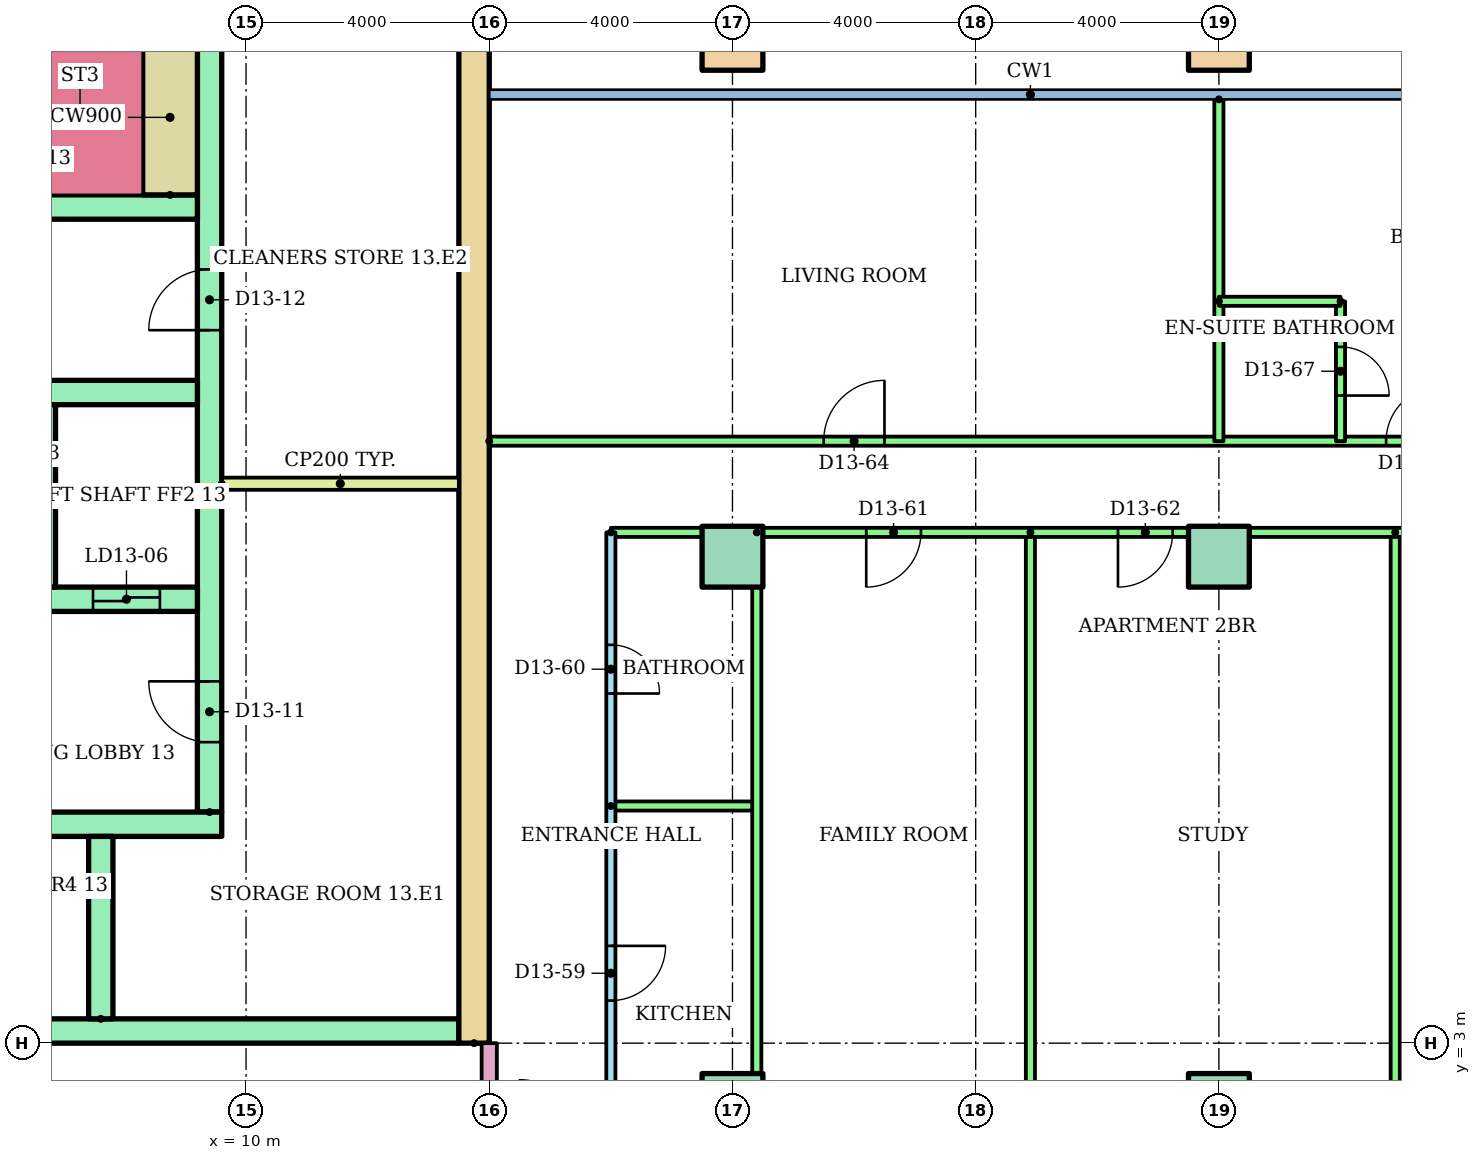
"""IFC4 building model, lengths in metres.
Left out: names, types, materials, properties, quantities, classifications, styles, units other than length and angle.
Written with IfcOpenShell. Run it as: python <this file> out.ifc"""

import sys

from ifc_helpers import new_model, si_unit, direction, frame, frame_2d, origin, origin_2d, place, context, subcontext, project, spatial, rectangle, hollow_rectangle, extrude, element, fill, save


model = new_model("IFC4")
c1 = context("Model", 3, precision=1e-05, world=origin(), true_north=direction((0.0, 1.0)))
c2 = subcontext(c1, "Body", "Model", "MODEL_VIEW")
j1 = project(units=[si_unit("LENGTHUNIT", "METRE"), si_unit("PLANEANGLEUNIT", "RADIAN")], contexts=[c1])
p1 = place(None, origin())
s1 = spatial("IfcSite", under=j1, at=p1, CompositionType="ELEMENT")
p2 = place(p1, origin())
s2 = spatial("IfcBuilding", under=s1, at=p2, CompositionType="ELEMENT")
p3 = place(p2, frame((0.0, 0.0, 51.2)))
s3 = spatial("IfcBuildingStorey", under=s2, at=p3, CompositionType="ELEMENT", Elevation=51.2)
for number, where in (
    (1, (18.0, 2.0, 0.0)),
    (2, (26.0, 2.0, 0.0)),
    (3, (18.0, 11.0, 0.0)),
    (4, (26.0, 11.0, 0.0)),
):
    element("IfcColumn", number, at=place(p3, frame(where)), inside=s3, PredefinedType="COLUMN", context=c2, shape_type="SweptSolid", body=[
        extrude(rectangle(XDim=1.0, YDim=1.0, at=origin_2d()), origin(), (0.0, 0.0, 1.0), 3.2),
    ])
for number, where in (
    (5, (18.0, 19.5, 0.0)),
    (6, (26.0, 19.5, 0.0)),
):
    element("IfcColumn", number, at=place(p3, frame(where)), inside=s3, PredefinedType="COLUMN", context=c2, shape_type="SweptSolid", body=[
        extrude(hollow_rectangle(XDim=1.0, YDim=1.0, WallThickness=0.05, at=origin_2d()), origin(), (0.0, 0.0, 1.0), 3.2),
    ])
p4 = place(p3, frame((13.75, 3.0, 0.0), z_axis=(0.0, 0.0, 1.0), x_axis=(0.0, 1.0, 0.0)))
e7 = element("IfcWall", 7, at=p4, inside=s3, PredefinedType="SHEAR", context=c2, shape_type="SweptSolid", body=[
    extrude(rectangle(XDim=17.0, YDim=0.5, at=frame_2d((8.5, 0.0))), origin(), (0.0, 0.0, 1.0), 2.92),
])
p5 = place(p3, frame((9.4, 6.8, 0.0), z_axis=(0.0, 0.0, 1.0), x_axis=(0.0, 1.0, 0.0)))
e8 = element("IfcWall", 8, at=p5, inside=s3, PredefinedType="SHEAR", context=c2, shape_type="SweptSolid", body=[
    extrude(rectangle(XDim=12.7, YDim=0.4, at=frame_2d((6.35, 0.0))), origin(), (0.0, 0.0, 1.0), 2.92),
])
p6 = place(p5, frame((1.15, 0.0, 0.0)))
e9 = element("IfcOpeningElement", 9, at=p6, cuts=e8, PredefinedType="OPENING", context=c2, shape_type="SweptSolid", body=[
    extrude(rectangle(XDim=1.0, YDim=2.1, at=frame_2d((0.5, 1.05))), frame((0.0, 0.21, 0.0), z_axis=(0.0, -1.0, 0.0), x_axis=(1.0, 0.0, 0.0)), (0.0, 0.0, 1.0), 0.42),
])
p7 = place(p5, frame((7.925, 0.0, 0.0)))
e10 = element("IfcOpeningElement", 10, at=p7, cuts=e8, PredefinedType="OPENING", context=c2, shape_type="SweptSolid", body=[
    extrude(rectangle(XDim=1.0, YDim=2.1, at=frame_2d((0.5, 1.05))), frame((0.0, 0.21, 0.0), z_axis=(0.0, -1.0, 0.0), x_axis=(1.0, 0.0, 0.0)), (0.0, 0.0, 1.0), 0.42),
])
p8 = place(p3, frame((-13.5, 3.2, 0.0)))
e11 = element("IfcWall", 11, at=p8, inside=s3, PredefinedType="SHEAR", context=c2, shape_type="SweptSolid", body=[
    extrude(rectangle(XDim=27.0, YDim=0.4, at=frame_2d((13.5, 0.0))), origin(), (0.0, 0.0, 1.0), 2.92),
])
p9 = place(p8, frame((6.861, 0.0, 0.0)))
e12 = element("IfcOpeningElement", 12, at=p9, cuts=e11, PredefinedType="OPENING", context=c2, shape_type="SweptSolid", body=[
    extrude(rectangle(XDim=1.1, YDim=2.1, at=frame_2d((0.55, 1.05))), frame((0.0, 0.21, 0.0), z_axis=(0.0, -1.0, 0.0), x_axis=(1.0, 0.0, 0.0)), (0.0, 0.0, 1.0), 0.42),
])
p10 = place(p8, frame((9.906, 0.0, 0.0)))
e13 = element("IfcOpeningElement", 13, at=p10, cuts=e11, PredefinedType="OPENING", context=c2, shape_type="SweptSolid", body=[
    extrude(rectangle(XDim=1.1, YDim=2.1, at=frame_2d((0.55, 1.05))), frame((0.0, 0.21, 0.0), z_axis=(0.0, -1.0, 0.0), x_axis=(1.0, 0.0, 0.0)), (0.0, 0.0, 1.0), 0.42),
])
p11 = place(p8, frame((15.994, 0.0, 0.0)))
e14 = element("IfcOpeningElement", 14, at=p11, cuts=e11, PredefinedType="OPENING", context=c2, shape_type="SweptSolid", body=[
    extrude(rectangle(XDim=1.1, YDim=2.1, at=frame_2d((0.55, 1.05))), frame((0.0, 0.21, 0.0), z_axis=(0.0, -1.0, 0.0), x_axis=(1.0, 0.0, 0.0)), (0.0, 0.0, 1.0), 0.42),
])
p12 = place(p8, frame((19.039, 0.0, 0.0)))
e15 = element("IfcOpeningElement", 15, at=p12, cuts=e11, PredefinedType="OPENING", context=c2, shape_type="SweptSolid", body=[
    extrude(rectangle(XDim=1.1, YDim=2.1, at=frame_2d((0.55, 1.05))), frame((0.0, 0.21, 0.0), z_axis=(0.0, -1.0, 0.0), x_axis=(1.0, 0.0, 0.0)), (0.0, 0.0, 1.0), 0.42),
])
p13 = place(p8, frame((12.6, 0.0, 0.0)))
e16 = element("IfcOpeningElement", 16, at=p13, cuts=e11, PredefinedType="OPENING", context=c2, shape_type="SweptSolid", body=[
    extrude(rectangle(XDim=1.8, YDim=2.1, at=frame_2d((0.9, 1.05))), frame((0.0, 0.21, 0.0), z_axis=(0.0, -1.0, 0.0), x_axis=(1.0, 0.0, 0.0)), (0.0, 0.0, 1.0), 0.42),
])
p14 = place(p3, frame((1.522, 6.6, 0.0)))
e17 = element("IfcWall", 17, at=p14, inside=s3, PredefinedType="SHEAR", context=c2, shape_type="SweptSolid", body=[
    extrude(rectangle(XDim=8.078, YDim=0.4, at=frame_2d((4.039, 0.0))), origin(), (0.0, 0.0, 1.0), 2.92),
])
p15 = place(p3, frame((7.611, 3.4, 0.0), z_axis=(0.0, 0.0, 1.0), x_axis=(0.0, 1.0, 0.0)))
e18 = element("IfcWall", 18, at=p15, inside=s3, PredefinedType="SHEAR", context=c2, shape_type="SweptSolid", body=[
    extrude(rectangle(XDim=3.0, YDim=0.4, at=frame_2d((1.5, 0.0))), origin(), (0.0, 0.0, 1.0), 2.92),
])
p16 = place(p3, frame((1.2, 10.3, 0.0)))
e19 = element("IfcWall", 19, at=p16, inside=s3, PredefinedType="SHEAR", context=c2, shape_type="SweptSolid", body=[
    extrude(rectangle(XDim=8.0, YDim=0.4, at=frame_2d((4.0, 0.0))), origin(), (0.0, 0.0, 1.0), 2.92),
])
p17 = place(p16, frame((3.55, 0.0, 0.0)))
e20 = element("IfcOpeningElement", 20, at=p17, cuts=e19, PredefinedType="OPENING", context=c2, shape_type="SweptSolid", body=[
    extrude(rectangle(XDim=1.1, YDim=2.1, at=frame_2d((0.55, 1.05))), frame((0.0, 0.21, 0.0), z_axis=(0.0, -1.0, 0.0), x_axis=(1.0, 0.0, 0.0)), (0.0, 0.0, 1.0), 0.42),
])
p18 = place(p16, frame((6.283, 0.0, 0.0)))
e21 = element("IfcOpeningElement", 21, at=p18, cuts=e19, PredefinedType="OPENING", context=c2, shape_type="SweptSolid", body=[
    extrude(rectangle(XDim=1.1, YDim=2.1, at=frame_2d((0.55, 1.05))), frame((0.0, 0.21, 0.0), z_axis=(0.0, -1.0, 0.0), x_axis=(1.0, 0.0, 0.0)), (0.0, 0.0, 1.0), 0.42),
])
p19 = place(p16, frame((0.867, 0.0, 0.0)))
e22 = element("IfcOpeningElement", 22, at=p19, cuts=e19, PredefinedType="OPENING", context=c2, shape_type="SweptSolid", body=[
    extrude(rectangle(XDim=1.0, YDim=2.1, at=frame_2d((0.5, 1.05))), frame((0.0, 0.21, 0.0), z_axis=(0.0, -1.0, 0.0), x_axis=(1.0, 0.0, 0.0)), (0.0, 0.0, 1.0), 0.42),
])
p20 = place(p3, frame((1.2, 13.7, 0.0)))
e23 = element("IfcWall", 23, at=p20, inside=s3, PredefinedType="SHEAR", context=c2, shape_type="SweptSolid", body=[
    extrude(rectangle(XDim=8.0, YDim=0.4, at=frame_2d((4.0, 0.0))), origin(), (0.0, 0.0, 1.0), 2.92),
])
p21 = place(p3, frame((6.667, 10.5, 0.0), z_axis=(0.0, 0.0, 1.0), x_axis=(0.0, 1.0, 0.0)))
e24 = element("IfcWall", 24, at=p21, inside=s3, PredefinedType="SHEAR", context=c2, shape_type="SweptSolid", body=[
    extrude(rectangle(XDim=3.0, YDim=0.4, at=frame_2d((1.5, 0.0))), origin(), (0.0, 0.0, 1.0), 2.92),
])
p22 = place(p3, frame((-9.2, 16.75, 0.0)))
e25 = element("IfcWall", 25, at=p22, inside=s3, PredefinedType="SHEAR", context=c2, shape_type="SweptSolid", body=[
    extrude(rectangle(XDim=18.4, YDim=0.4, at=frame_2d((9.2, 0.0))), origin(), (0.0, 0.0, 1.0), 2.92),
])
p23 = place(p22, frame((0.1, 0.0, 0.0)))
e26 = element("IfcOpeningElement", 26, at=p23, cuts=e25, PredefinedType="OPENING", context=c2, shape_type="SweptSolid", body=[
    extrude(rectangle(XDim=0.95, YDim=2.1, at=frame_2d((0.475, 1.05))), frame((0.0, 0.21, 0.0), z_axis=(0.0, -1.0, 0.0), x_axis=(1.0, 0.0, 0.0)), (0.0, 0.0, 1.0), 0.42),
])
p24 = place(p22, frame((6.1, 0.0, 0.0)))
e27 = element("IfcOpeningElement", 27, at=p24, cuts=e25, PredefinedType="OPENING", context=c2, shape_type="SweptSolid", body=[
    extrude(rectangle(XDim=0.95, YDim=2.1, at=frame_2d((0.475, 1.05))), frame((0.0, 0.21, 0.0), z_axis=(0.0, -1.0, 0.0), x_axis=(1.0, 0.0, 0.0)), (0.0, 0.0, 1.0), 0.42),
])
p25 = place(p22, frame((12.1, 0.0, 0.0)))
e28 = element("IfcOpeningElement", 28, at=p25, cuts=e25, PredefinedType="OPENING", context=c2, shape_type="SweptSolid", body=[
    extrude(rectangle(XDim=0.95, YDim=2.1, at=frame_2d((0.475, 1.05))), frame((0.0, 0.21, 0.0), z_axis=(0.0, -1.0, 0.0), x_axis=(1.0, 0.0, 0.0)), (0.0, 0.0, 1.0), 0.42),
])
p26 = place(p3, frame((8.75, 16.95, 0.0), z_axis=(0.0, 0.0, 1.0), x_axis=(0.0, 1.0, 0.0)))
e29 = element("IfcWall", 29, at=p26, inside=s3, PredefinedType="SHEAR", context=c2, shape_type="SweptSolid", body=[
    extrude(rectangle(XDim=2.55, YDim=0.9, at=frame_2d((1.275, 0.0))), origin(), (0.0, 0.0, 1.0), 2.92),
])
p27 = place(p3, frame((9.6, 12.2, 0.0)))
e30 = element("IfcWall", 30, at=p27, inside=s3, PredefinedType="PARTITIONING", context=c2, shape_type="SweptSolid", body=[
    extrude(rectangle(XDim=3.9, YDim=0.2, at=frame_2d((1.95, 0.0))), origin(), (0.0, 0.0, 1.0), 2.92),
])
p28 = place(p3, frame((16.0, 11.4, 0.0), z_axis=(0.0, 0.0, 1.0), x_axis=(0.0, -1.0, 0.0)))
e31 = element("IfcWall", 31, at=p28, inside=s3, PredefinedType="PARTITIONING", context=c2, shape_type="SweptSolid", body=[
    extrude(rectangle(XDim=10.0, YDim=0.15, at=frame_2d((5.0, 0.0))), origin(), (0.0, 0.0, 1.0), 2.4),
])
p29 = place(p28, frame((6.8, 0.0, 0.0)))
e32 = element("IfcOpeningElement", 32, at=p29, cuts=e31, PredefinedType="OPENING", context=c2, shape_type="SweptSolid", body=[
    extrude(rectangle(XDim=0.9, YDim=2.1, at=frame_2d((0.45, 1.05))), frame((0.0, 0.085, 0.0), z_axis=(0.0, -1.0, 0.0), x_axis=(1.0, 0.0, 0.0)), (0.0, 0.0, 1.0), 0.17),
])
p30 = place(p28, frame((1.85, 0.0, 0.0)))
e33 = element("IfcOpeningElement", 33, at=p30, cuts=e31, PredefinedType="OPENING", context=c2, shape_type="SweptSolid", body=[
    extrude(rectangle(XDim=0.8, YDim=2.1, at=frame_2d((0.4, 1.05))), frame((0.0, 0.085, 0.0), z_axis=(0.0, -1.0, 0.0), x_axis=(1.0, 0.0, 0.0)), (0.0, 0.0, 1.0), 0.17),
])
p31 = place(p3, frame((16.0, 6.9, 0.0)))
e34 = element("IfcWall", 34, at=p31, inside=s3, PredefinedType="PARTITIONING", context=c2, shape_type="SweptSolid", body=[
    extrude(rectangle(XDim=2.4, YDim=0.15, at=frame_2d((1.2, 0.0))), origin(), (0.0, 0.0, 1.0), 2.4),
])
for number, where, z_axis, x_axis in (
    (35, (18.4, 11.4, 0.0), (0.0, 0.0, 1.0), (0.0, -1.0, 0.0)),
    (36, (22.9, 11.4, 0.0), (0.0, 0.0, 1.0), (0.0, -1.0, 0.0)),
    (37, (28.9, 11.4, 0.0), (0.0, 0.0, 1.0), (0.0, -1.0, 0.0)),
):
    element("IfcWall", number, at=place(p3, frame(where, z_axis=z_axis, x_axis=x_axis)), inside=s3, PredefinedType="PARTITIONING", context=c2, shape_type="SweptSolid", body=[
        extrude(rectangle(XDim=10.0, YDim=0.15, at=frame_2d((5.0, 0.0))), origin(), (0.0, 0.0, 1.0), 2.4),
    ])
p32 = place(p3, frame((36.52, 11.4, 0.0), z_axis=(0.0, 0.0, 1.0), x_axis=(-1.0, 0.0, 0.0)))
e38 = element("IfcWall", 38, at=p32, inside=s3, PredefinedType="PARTITIONING", context=c2, shape_type="SweptSolid", body=[
    extrude(rectangle(XDim=20.52, YDim=0.15, at=frame_2d((10.26, 0.0))), origin(), (0.0, 0.0, 1.0), 2.4),
])
p33 = place(p32, frame((15.42, 0.0, 0.0)))
e39 = element("IfcOpeningElement", 39, at=p33, cuts=e38, PredefinedType="OPENING", context=c2, shape_type="SweptSolid", body=[
    extrude(rectangle(XDim=0.9, YDim=2.1, at=frame_2d((0.45, 1.05))), frame((0.0, 0.085, 0.0), z_axis=(0.0, -1.0, 0.0), x_axis=(1.0, 0.0, 0.0)), (0.0, 0.0, 1.0), 0.17),
])
p34 = place(p32, frame((11.28, 0.0, 0.0)))
e40 = element("IfcOpeningElement", 40, at=p34, cuts=e38, PredefinedType="OPENING", context=c2, shape_type="SweptSolid", body=[
    extrude(rectangle(XDim=0.9, YDim=2.1, at=frame_2d((0.45, 1.05))), frame((0.0, 0.085, 0.0), z_axis=(0.0, -1.0, 0.0), x_axis=(1.0, 0.0, 0.0)), (0.0, 0.0, 1.0), 0.17),
])
p35 = place(p32, frame((3.47, 0.0, 0.0)))
e41 = element("IfcOpeningElement", 41, at=p35, cuts=e38, PredefinedType="OPENING", context=c2, shape_type="SweptSolid", body=[
    extrude(rectangle(XDim=0.9, YDim=2.1, at=frame_2d((0.45, 1.05))), frame((0.0, 0.085, 0.0), z_axis=(0.0, -1.0, 0.0), x_axis=(1.0, 0.0, 0.0)), (0.0, 0.0, 1.0), 0.17),
])
p36 = place(p3, frame((14.0, 12.9, 0.0)))
e42 = element("IfcWall", 42, at=p36, inside=s3, PredefinedType="PARTITIONING", context=c2, shape_type="SweptSolid", body=[
    extrude(rectangle(XDim=22.52, YDim=0.15, at=frame_2d((11.26, 0.0))), origin(), (0.0, 0.0, 1.0), 2.4),
])
p37 = place(p36, frame((5.5, 0.0, 0.0)))
e43 = element("IfcOpeningElement", 43, at=p37, cuts=e42, PredefinedType="OPENING", context=c2, shape_type="SweptSolid", body=[
    extrude(rectangle(XDim=1.0, YDim=2.1, at=frame_2d((0.5, 1.05))), frame((0.0, 0.085, 0.0), z_axis=(0.0, -1.0, 0.0), x_axis=(1.0, 0.0, 0.0)), (0.0, 0.0, 1.0), 0.17),
])
p38 = place(p36, frame((14.75, 0.0, 0.0)))
e44 = element("IfcOpeningElement", 44, at=p38, cuts=e42, PredefinedType="OPENING", context=c2, shape_type="SweptSolid", body=[
    extrude(rectangle(XDim=0.9, YDim=2.1, at=frame_2d((0.45, 1.05))), frame((0.0, 0.085, 0.0), z_axis=(0.0, -1.0, 0.0), x_axis=(1.0, 0.0, 0.0)), (0.0, 0.0, 1.0), 0.17),
])
p39 = place(p36, frame((20.76, 0.0, 0.0)))
e45 = element("IfcOpeningElement", 45, at=p39, cuts=e42, PredefinedType="OPENING", context=c2, shape_type="SweptSolid", body=[
    extrude(rectangle(XDim=0.9, YDim=2.1, at=frame_2d((0.45, 1.05))), frame((0.0, 0.085, 0.0), z_axis=(0.0, -1.0, 0.0), x_axis=(1.0, 0.0, 0.0)), (0.0, 0.0, 1.0), 0.17),
])
p40 = place(p3, frame((26.0, 18.521, 0.0), z_axis=(0.0, 0.0, 1.0), x_axis=(0.0, -1.0, 0.0)))
e46 = element("IfcWall", 46, at=p40, inside=s3, PredefinedType="PARTITIONING", context=c2, shape_type="SweptSolid", body=[
    extrude(rectangle(XDim=5.621, YDim=0.15, at=frame_2d((2.811, 0.0))), origin(), (0.0, 0.0, 1.0), 2.4),
])
p41 = place(p3, frame((28.0, 15.2, 0.0), z_axis=(0.0, 0.0, 1.0), x_axis=(0.0, -1.0, 0.0)))
e47 = element("IfcWall", 47, at=p41, inside=s3, PredefinedType="PARTITIONING", context=c2, shape_type="SweptSolid", body=[
    extrude(rectangle(XDim=2.3, YDim=0.15, at=frame_2d((1.15, 0.0))), origin(), (0.0, 0.0, 1.0), 2.4),
])
p42 = place(p41, frame((0.75, 0.0, 0.0)))
e48 = element("IfcOpeningElement", 48, at=p42, cuts=e47, PredefinedType="OPENING", context=c2, shape_type="SweptSolid", body=[
    extrude(rectangle(XDim=0.8, YDim=2.1, at=frame_2d((0.4, 1.05))), frame((0.0, 0.085, 0.0), z_axis=(0.0, -1.0, 0.0), x_axis=(1.0, 0.0, 0.0)), (0.0, 0.0, 1.0), 0.17),
])
p43 = place(p3, frame((26.0, 15.2, 0.0)))
e49 = element("IfcWall", 49, at=p43, inside=s3, PredefinedType="PARTITIONING", context=c2, shape_type="SweptSolid", body=[
    extrude(rectangle(XDim=2.0, YDim=0.15, at=frame_2d((1.0, 0.0))), origin(), (0.0, 0.0, 1.0), 2.4),
])
p44 = place(p3, frame((14.0, 1.4, 0.0), z_axis=(0.0, 0.0, 1.0), x_axis=(0.0, 1.0, 0.0)))
e50 = element("IfcWall", 50, at=p44, inside=s3, PredefinedType="PARTITIONING", context=c2, shape_type="SweptSolid", body=[
    extrude(rectangle(XDim=1.6, YDim=0.25, at=frame_2d((0.8, 0.0))), origin(), (0.0, 0.0, 1.0), 2.4),
])
p45 = place(p18, origin())
e51 = element("IfcDoor", 51, at=p45, inside=s3, OperationType="SLIDING_TO_LEFT", PredefinedType="DOOR", context=c2, shape_type="SweptSolid", body=[
    extrude(rectangle(XDim=1.1, YDim=2.1, at=frame_2d((0.55, 1.05))), frame((0.0, 0.025, 0.0), z_axis=(0.0, -1.0, 0.0), x_axis=(1.0, 0.0, 0.0)), (0.0, 0.0, 1.0), 0.05),
])
fill(e21, e51)
p46 = place(p6, origin())
e52 = element("IfcDoor", 52, at=p46, inside=s3, OperationType="SINGLE_SWING_RIGHT", PredefinedType="DOOR", context=c2, shape_type="SweptSolid", body=[
    extrude(rectangle(XDim=1.0, YDim=2.1, at=frame_2d((0.5, 1.05))), frame((0.0, 0.025, 0.0), z_axis=(0.0, -1.0, 0.0), x_axis=(1.0, 0.0, 0.0)), (0.0, 0.0, 1.0), 0.05),
])
fill(e9, e52)
p47 = place(p7, origin())
e53 = element("IfcDoor", 53, at=p47, inside=s3, OperationType="SINGLE_SWING_LEFT", PredefinedType="DOOR", context=c2, shape_type="SweptSolid", body=[
    extrude(rectangle(XDim=1.0, YDim=2.1, at=frame_2d((0.5, 1.05))), frame((0.0, 0.025, 0.0), z_axis=(0.0, -1.0, 0.0), x_axis=(1.0, 0.0, 0.0)), (0.0, 0.0, 1.0), 0.05),
])
fill(e10, e53)
p48 = place(p29, origin())
e54 = element("IfcDoor", 54, at=p48, inside=s3, OperationType="SINGLE_SWING_LEFT", PredefinedType="DOOR", context=c2, shape_type="SweptSolid", body=[
    extrude(rectangle(XDim=0.9, YDim=2.1, at=frame_2d((0.45, 1.05))), frame((0.0, 0.025, 0.0), z_axis=(0.0, -1.0, 0.0), x_axis=(1.0, 0.0, 0.0)), (0.0, 0.0, 1.0), 0.05),
])
fill(e32, e54)
p49 = place(p30, origin())
e55 = element("IfcDoor", 55, at=p49, inside=s3, OperationType="SINGLE_SWING_RIGHT", PredefinedType="DOOR", context=c2, shape_type="SweptSolid", body=[
    extrude(rectangle(XDim=0.8, YDim=2.1, at=frame_2d((0.4, 1.05))), frame((0.0, 0.025, 0.0), z_axis=(0.0, -1.0, 0.0), x_axis=(1.0, 0.0, 0.0)), (0.0, 0.0, 1.0), 0.05),
])
fill(e33, e55)
p50 = place(p33, origin())
e56 = element("IfcDoor", 56, at=p50, inside=s3, OperationType="SINGLE_SWING_RIGHT", PredefinedType="DOOR", context=c2, shape_type="SweptSolid", body=[
    extrude(rectangle(XDim=0.9, YDim=2.1, at=frame_2d((0.45, 1.05))), frame((0.0, 0.025, 0.0), z_axis=(0.0, -1.0, 0.0), x_axis=(1.0, 0.0, 0.0)), (0.0, 0.0, 1.0), 0.05),
])
fill(e39, e56)
p51 = place(p34, origin())
e57 = element("IfcDoor", 57, at=p51, inside=s3, OperationType="SINGLE_SWING_RIGHT", PredefinedType="DOOR", context=c2, shape_type="SweptSolid", body=[
    extrude(rectangle(XDim=0.9, YDim=2.1, at=frame_2d((0.45, 1.05))), frame((0.0, 0.025, 0.0), z_axis=(0.0, -1.0, 0.0), x_axis=(1.0, 0.0, 0.0)), (0.0, 0.0, 1.0), 0.05),
])
fill(e40, e57)
p52 = place(p37, origin())
e58 = element("IfcDoor", 58, at=p52, inside=s3, OperationType="SINGLE_SWING_RIGHT", PredefinedType="DOOR", context=c2, shape_type="SweptSolid", body=[
    extrude(rectangle(XDim=1.0, YDim=2.1, at=frame_2d((0.5, 1.05))), frame((0.0, 0.025, 0.0), z_axis=(0.0, -1.0, 0.0), x_axis=(1.0, 0.0, 0.0)), (0.0, 0.0, 1.0), 0.05),
])
fill(e43, e58)
p53 = place(p38, origin())
e59 = element("IfcDoor", 59, at=p53, inside=s3, OperationType="SINGLE_SWING_RIGHT", PredefinedType="DOOR", context=c2, shape_type="SweptSolid", body=[
    extrude(rectangle(XDim=0.9, YDim=2.1, at=frame_2d((0.45, 1.05))), frame((0.0, 0.025, 0.0), z_axis=(0.0, -1.0, 0.0), x_axis=(1.0, 0.0, 0.0)), (0.0, 0.0, 1.0), 0.05),
])
fill(e44, e59)
p54 = place(p42, origin())
e60 = element("IfcDoor", 60, at=p54, inside=s3, OperationType="SINGLE_SWING_RIGHT", PredefinedType="DOOR", context=c2, shape_type="SweptSolid", body=[
    extrude(rectangle(XDim=0.8, YDim=2.1, at=frame_2d((0.4, 1.05))), frame((0.0, 0.025, 0.0), z_axis=(0.0, -1.0, 0.0), x_axis=(1.0, 0.0, 0.0)), (0.0, 0.0, 1.0), 0.05),
])
fill(e48, e60)
save(model, sys.argv[1])
